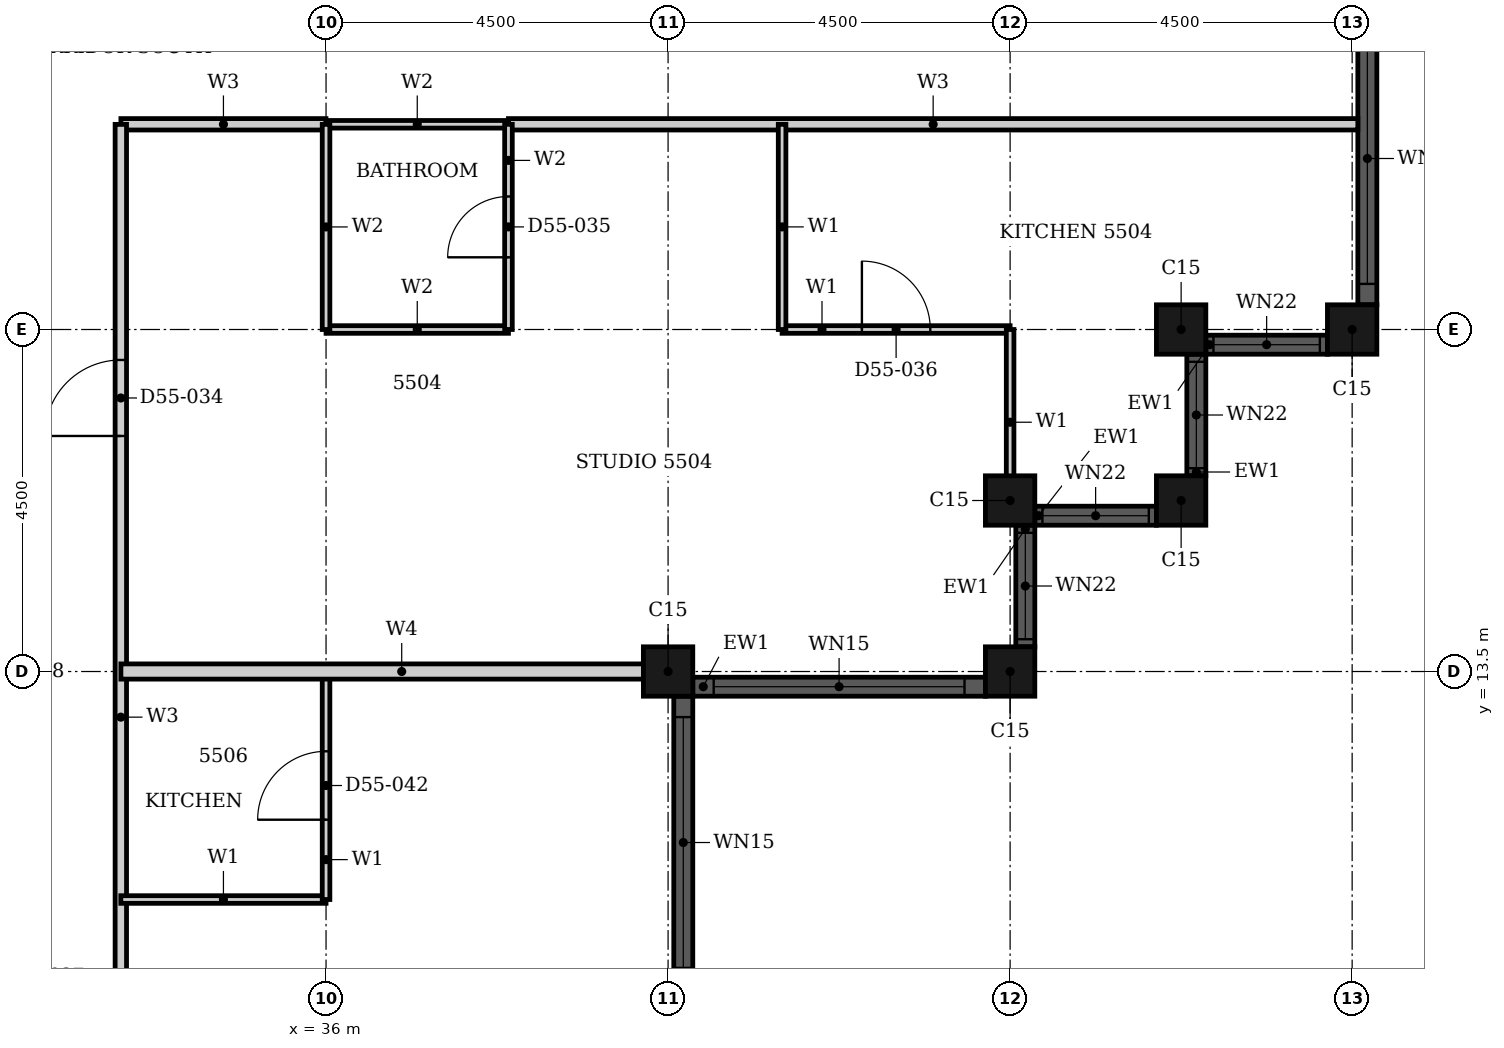
"""IFC4 building model, lengths in metres.
Left out: names, types, materials, properties, quantities, classifications, styles, units other than length and angle.
Written with IfcOpenShell. Run it as: python <this file> out.ifc"""

import sys

from ifc_helpers import new_model, si_unit, direction, frame, frame_2d, origin, origin_2d, place, context, subcontext, project, spatial, rectangle, hollow_rectangle, extrude, element, fill, save


model = new_model("IFC4")
c1 = context("Model", 3, precision=1e-05, world=origin(), true_north=direction((0.0, 1.0)))
c2 = subcontext(c1, "Body", "Model", "MODEL_VIEW")
j1 = project(units=[si_unit("LENGTHUNIT", "METRE"), si_unit("PLANEANGLEUNIT", "RADIAN")], contexts=[c1])
p1 = place(None, origin())
s1 = spatial("IfcSite", under=j1, at=p1, CompositionType="ELEMENT")
p2 = place(p1, origin())
s2 = spatial("IfcBuilding", under=s1, at=p2, CompositionType="ELEMENT")
p3 = place(p2, frame((0.0, 0.0, 218.3)))
s3 = spatial("IfcBuildingStorey", under=s2, at=p3, CompositionType="ELEMENT", Elevation=218.3)
for number, where, z_axis, x_axis in (
    (1, (40.5, 13.5, 0.0), (0.0, 0.0, 1.0), (1.0, 0.0, 0.0)),
    (2, (45.0, 13.5, 0.0), (0.0, 0.0, 1.0), (1.0, 0.0, 0.0)),
    (3, (45.0, 15.75, 0.0), (0.0, 0.0, 1.0), (1.0, 0.0, 0.0)),
    (4, (47.25, 15.75, 0.0), (0.0, 0.0, 1.0), (1.0, 0.0, 0.0)),
    (5, (47.25, 18.0, 0.0), (0.0, 0.0, 1.0), (1.0, 0.0, 0.0)),
    (6, (49.5, 18.0, 0.0), (0.0, 0.0, 1.0), (1.0, 0.0, 0.0)),
):
    element("IfcColumn", number, at=place(p3, frame(where, z_axis=z_axis, x_axis=x_axis)), inside=s3, PredefinedType="COLUMN", context=c2, shape_type="SweptSolid", body=[
        extrude(hollow_rectangle(XDim=0.65, YDim=0.65, WallThickness=0.021, at=origin_2d()), origin(), (0.0, 0.0, 1.0), 3.7),
    ])
p4 = place(p3, frame((40.825, 13.3, 0.0), z_axis=(0.0, 0.0, 1.0), x_axis=(1.0, 0.0, 0.0)))
e7 = element("IfcWall", 7, at=p4, inside=s3, PredefinedType="SOLIDWALL", context=c2, shape_type="SweptSolid", body=[
    extrude(rectangle(XDim=3.85, YDim=0.25, at=frame_2d((1.925, 0.0))), origin(), (0.0, 0.0, 1.0), 3.7),
])
p5 = place(p4, frame((0.275, 0.0, 0.45)))
e8 = element("IfcOpeningElement", 8, at=p5, cuts=e7, PredefinedType="OPENING", context=c2, shape_type="SweptSolid", body=[
    extrude(rectangle(XDim=3.3, YDim=2.3, at=frame_2d((1.65, 1.15))), frame((0.0, 0.135, 0.0), z_axis=(0.0, -1.0, 0.0), x_axis=(1.0, 0.0, 0.0)), (0.0, 0.0, 1.0), 0.27),
])
p6 = place(p3, frame((45.2, 13.825, 0.0), z_axis=(0.0, 0.0, 1.0), x_axis=(0.0, 1.0, 0.0)))
e9 = element("IfcWall", 9, at=p6, inside=s3, PredefinedType="SOLIDWALL", context=c2, shape_type="SweptSolid", body=[
    extrude(rectangle(XDim=1.6, YDim=0.25, at=frame_2d((0.8, 0.0))), origin(), (0.0, 0.0, 1.0), 3.7),
])
p7 = place(p6, frame((0.1, 0.0, 0.9)))
e10 = element("IfcOpeningElement", 10, at=p7, cuts=e9, PredefinedType="OPENING", context=c2, shape_type="SweptSolid", body=[
    extrude(rectangle(XDim=1.4, YDim=1.85, at=frame_2d((0.7, 0.925))), frame((0.0, 0.135, 0.0), z_axis=(0.0, -1.0, 0.0), x_axis=(1.0, 0.0, 0.0)), (0.0, 0.0, 1.0), 0.27),
])
p8 = place(p3, frame((45.325, 15.55, 0.0), z_axis=(0.0, 0.0, 1.0), x_axis=(1.0, 0.0, 0.0)))
e11 = element("IfcWall", 11, at=p8, inside=s3, PredefinedType="SOLIDWALL", context=c2, shape_type="SweptSolid", body=[
    extrude(rectangle(XDim=1.6, YDim=0.25, at=frame_2d((0.8, 0.0))), origin(), (0.0, 0.0, 1.0), 3.7),
])
p9 = place(p8, frame((0.1, 0.0, 0.9)))
e12 = element("IfcOpeningElement", 12, at=p9, cuts=e11, PredefinedType="OPENING", context=c2, shape_type="SweptSolid", body=[
    extrude(rectangle(XDim=1.4, YDim=1.85, at=frame_2d((0.7, 0.925))), frame((0.0, 0.135, 0.0), z_axis=(0.0, -1.0, 0.0), x_axis=(1.0, 0.0, 0.0)), (0.0, 0.0, 1.0), 0.27),
])
p10 = place(p3, frame((47.45, 16.075, 0.0), z_axis=(0.0, 0.0, 1.0), x_axis=(0.0, 1.0, 0.0)))
e13 = element("IfcWall", 13, at=p10, inside=s3, PredefinedType="SOLIDWALL", context=c2, shape_type="SweptSolid", body=[
    extrude(rectangle(XDim=1.6, YDim=0.25, at=frame_2d((0.8, 0.0))), origin(), (0.0, 0.0, 1.0), 3.7),
])
p11 = place(p10, frame((0.1, 0.0, 0.9)))
e14 = element("IfcOpeningElement", 14, at=p11, cuts=e13, PredefinedType="OPENING", context=c2, shape_type="SweptSolid", body=[
    extrude(rectangle(XDim=1.4, YDim=1.85, at=frame_2d((0.7, 0.925))), frame((0.0, 0.135, 0.0), z_axis=(0.0, -1.0, 0.0), x_axis=(1.0, 0.0, 0.0)), (0.0, 0.0, 1.0), 0.27),
])
p12 = place(p3, frame((47.575, 17.8, 0.0), z_axis=(0.0, 0.0, 1.0), x_axis=(1.0, 0.0, 0.0)))
e15 = element("IfcWall", 15, at=p12, inside=s3, PredefinedType="SOLIDWALL", context=c2, shape_type="SweptSolid", body=[
    extrude(rectangle(XDim=1.6, YDim=0.25, at=frame_2d((0.8, 0.0))), origin(), (0.0, 0.0, 1.0), 3.7),
])
p13 = place(p12, frame((0.1, 0.0, 0.9)))
e16 = element("IfcOpeningElement", 16, at=p13, cuts=e15, PredefinedType="OPENING", context=c2, shape_type="SweptSolid", body=[
    extrude(rectangle(XDim=1.4, YDim=1.85, at=frame_2d((0.7, 0.925))), frame((0.0, 0.135, 0.0), z_axis=(0.0, -1.0, 0.0), x_axis=(1.0, 0.0, 0.0)), (0.0, 0.0, 1.0), 0.27),
])
p14 = place(p3, frame((49.7, 18.325, 0.0), z_axis=(0.0, 0.0, 1.0), x_axis=(0.0, 1.0, 0.0)))
e17 = element("IfcWall", 17, at=p14, inside=s3, PredefinedType="SOLIDWALL", context=c2, shape_type="SweptSolid", body=[
    extrude(rectangle(XDim=8.35, YDim=0.25, at=frame_2d((4.175, 0.0))), origin(), (0.0, 0.0, 1.0), 3.7),
])
p15 = place(p14, frame((0.275, 0.0, 0.45)))
e18 = element("IfcOpeningElement", 18, at=p15, cuts=e17, PredefinedType="OPENING", context=c2, shape_type="SweptSolid", body=[
    extrude(rectangle(XDim=3.3, YDim=2.3, at=frame_2d((1.65, 1.15))), frame((0.0, 0.135, 0.0), z_axis=(0.0, -1.0, 0.0), x_axis=(1.0, 0.0, 0.0)), (0.0, 0.0, 1.0), 0.27),
])
p16 = place(p14, frame((4.775, 0.0, 0.45)))
e19 = element("IfcOpeningElement", 19, at=p16, cuts=e17, PredefinedType="OPENING", context=c2, shape_type="SweptSolid", body=[
    extrude(rectangle(XDim=3.3, YDim=2.3, at=frame_2d((1.65, 1.15))), frame((0.0, 0.135, 0.0), z_axis=(0.0, -1.0, 0.0), x_axis=(1.0, 0.0, 0.0)), (0.0, 0.0, 1.0), 0.27),
])
p17 = place(p3, frame((40.7, 4.825, 0.0), z_axis=(0.0, 0.0, 1.0), x_axis=(0.0, 1.0, 0.0)))
e20 = element("IfcWall", 20, at=p17, inside=s3, PredefinedType="SOLIDWALL", context=c2, shape_type="SweptSolid", body=[
    extrude(rectangle(XDim=8.35, YDim=0.25, at=frame_2d((4.175, 0.0))), origin(), (0.0, 0.0, 1.0), 3.7),
])
p18 = place(p17, frame((0.275, 0.0, 0.45)))
e21 = element("IfcOpeningElement", 21, at=p18, cuts=e20, PredefinedType="OPENING", context=c2, shape_type="SweptSolid", body=[
    extrude(rectangle(XDim=3.3, YDim=2.3, at=frame_2d((1.65, 1.15))), frame((0.0, 0.135, 0.0), z_axis=(0.0, -1.0, 0.0), x_axis=(1.0, 0.0, 0.0)), (0.0, 0.0, 1.0), 0.27),
])
p19 = place(p17, frame((4.775, 0.0, 0.45)))
e22 = element("IfcOpeningElement", 22, at=p19, cuts=e20, PredefinedType="OPENING", context=c2, shape_type="SweptSolid", body=[
    extrude(rectangle(XDim=3.3, YDim=2.3, at=frame_2d((1.65, 1.15))), frame((0.0, 0.135, 0.0), z_axis=(0.0, -1.0, 0.0), x_axis=(1.0, 0.0, 0.0)), (0.0, 0.0, 1.0), 0.27),
])
p20 = place(p3, frame((33.301, 20.7, 0.0), z_axis=(0.0, 0.0, 1.0), x_axis=(1.0, 0.0, 0.0)))
e23 = element("IfcWall", 23, at=p20, inside=s3, PredefinedType="PARTITIONING", context=c2, shape_type="SweptSolid", body=[
    extrude(rectangle(XDim=2.698, YDim=0.15, at=frame_2d((1.349, 0.0))), origin(), (0.0, 0.0, 1.0), 3.4),
])
p21 = place(p3, frame((38.4, 20.7, 0.0), z_axis=(0.0, 0.0, 1.0), x_axis=(1.0, 0.0, 0.0)))
e24 = element("IfcWall", 24, at=p21, inside=s3, PredefinedType="PARTITIONING", context=c2, shape_type="SweptSolid", body=[
    extrude(rectangle(XDim=11.175, YDim=0.15, at=frame_2d((5.587, 0.0))), origin(), (0.0, 0.0, 1.0), 3.4),
])
p22 = place(p3, frame((33.3, 6.9, 0.0), z_axis=(0.0, 0.0, 1.0), x_axis=(0.0, 1.0, 0.0)))
e25 = element("IfcWall", 25, at=p22, inside=s3, PredefinedType="PARTITIONING", context=c2, shape_type="SweptSolid", body=[
    extrude(rectangle(XDim=13.799, YDim=0.15, at=frame_2d((6.899, 0.0))), origin(), (0.0, 0.0, 1.0), 3.4),
])
p23 = place(p22, frame((9.699, 0.0, 0.0)))
e26 = element("IfcOpeningElement", 26, at=p23, cuts=e25, PredefinedType="OPENING", context=c2, shape_type="SweptSolid", body=[
    extrude(rectangle(XDim=1.0, YDim=2.2, at=frame_2d((0.5, 1.1))), frame((0.0, 0.085, 0.0), z_axis=(0.0, -1.0, 0.0), x_axis=(1.0, 0.0, 0.0)), (0.0, 0.0, 1.0), 0.17),
])
p24 = place(p22, frame((1.3, 0.0, 0.0)))
e27 = element("IfcOpeningElement", 27, at=p24, cuts=e25, PredefinedType="OPENING", context=c2, shape_type="SweptSolid", body=[
    extrude(rectangle(XDim=1.0, YDim=2.2, at=frame_2d((0.5, 1.1))), frame((0.0, 0.085, 0.0), z_axis=(0.0, -1.0, 0.0), x_axis=(1.0, 0.0, 0.0)), (0.0, 0.0, 1.0), 0.17),
])
p25 = place(p3, frame((33.3, 10.5, 0.0), z_axis=(0.0, 0.0, 1.0), x_axis=(1.0, 0.0, 0.0)))
e28 = element("IfcWall", 28, at=p25, inside=s3, PredefinedType="PARTITIONING", context=c2, shape_type="SweptSolid", body=[
    extrude(rectangle(XDim=2.7, YDim=0.1, at=frame_2d((1.35, 0.0))), origin(), (0.0, 0.0, 1.0), 3.4),
])
p26 = place(p3, frame((42.0, 18.0, 0.0), z_axis=(0.0, 0.0, 1.0), x_axis=(1.0, 0.0, 0.0)))
e29 = element("IfcWall", 29, at=p26, inside=s3, PredefinedType="PARTITIONING", context=c2, shape_type="SweptSolid", body=[
    extrude(rectangle(XDim=3.0, YDim=0.1, at=frame_2d((1.5, 0.0))), origin(), (0.0, 0.0, 1.0), 3.4),
])
p27 = place(p26, frame((1.05, 0.0, 0.0)))
e30 = element("IfcOpeningElement", 30, at=p27, cuts=e29, PredefinedType="OPENING", context=c2, shape_type="SweptSolid", body=[
    extrude(rectangle(XDim=0.9, YDim=2.1, at=frame_2d((0.45, 1.05))), frame((0.0, 0.06, 0.0), z_axis=(0.0, -1.0, 0.0), x_axis=(1.0, 0.0, 0.0)), (0.0, 0.0, 1.0), 0.12),
])
p28 = place(p3, frame((36.0, 10.5, 0.0), z_axis=(0.0, 0.0, 1.0), x_axis=(0.0, 1.0, 0.0)))
e31 = element("IfcWall", 31, at=p28, inside=s3, PredefinedType="PARTITIONING", context=c2, shape_type="SweptSolid", body=[
    extrude(rectangle(XDim=3.0, YDim=0.1, at=frame_2d((1.5, 0.0))), origin(), (0.0, 0.0, 1.0), 2.68),
])
p29 = place(p28, frame((1.05, 0.0, 0.0)))
e32 = element("IfcOpeningElement", 32, at=p29, cuts=e31, PredefinedType="OPENING", context=c2, shape_type="SweptSolid", body=[
    extrude(rectangle(XDim=0.9, YDim=2.1, at=frame_2d((0.45, 1.05))), frame((0.0, 0.06, 0.0), z_axis=(0.0, -1.0, 0.0), x_axis=(1.0, 0.0, 0.0)), (0.0, 0.0, 1.0), 0.12),
])
p30 = place(p3, frame((42.0, 18.0, 0.0), z_axis=(0.0, 0.0, 1.0), x_axis=(0.0, 1.0, 0.0)))
e33 = element("IfcWall", 33, at=p30, inside=s3, PredefinedType="PARTITIONING", context=c2, shape_type="SweptSolid", body=[
    extrude(rectangle(XDim=2.7, YDim=0.1, at=frame_2d((1.35, 0.0))), origin(), (0.0, 0.0, 1.0), 3.4),
])
p31 = place(p3, frame((45.0, 15.56, 0.0), z_axis=(0.0, 0.0, 1.0), x_axis=(0.0, 1.0, 0.0)))
e34 = element("IfcWall", 34, at=p31, inside=s3, PredefinedType="PARTITIONING", context=c2, shape_type="SweptSolid", body=[
    extrude(rectangle(XDim=2.44, YDim=0.1, at=frame_2d((1.22, 0.0))), origin(), (0.0, 0.0, 1.0), 3.4),
])
p32 = place(p3, frame((33.301, 13.5, 0.0), z_axis=(0.0, 0.0, 1.0), x_axis=(1.0, 0.0, 0.0)))
e35 = element("IfcWall", 35, at=p32, inside=s3, PredefinedType="PARTITIONING", context=c2, shape_type="SweptSolid", body=[
    extrude(rectangle(XDim=7.389, YDim=0.2, at=frame_2d((3.694, 0.0))), origin(), (0.0, 0.0, 1.0), 2.48),
])
for number, where, z_axis, x_axis in (
    (36, (36.0, 18.0, 0.0), (0.0, 0.0, 1.0), (1.0, 0.0, 0.0)),
    (37, (36.0, 20.7, 0.0), (0.0, 0.0, 1.0), (1.0, 0.0, 0.0)),
):
    element("IfcWall", number, at=place(p3, frame(where, z_axis=z_axis, x_axis=x_axis)), inside=s3, PredefinedType="PARTITIONING", context=c2, shape_type="SweptSolid", body=[
        extrude(rectangle(XDim=2.4, YDim=0.1, at=frame_2d((1.2, 0.0))), origin(), (0.0, 0.0, 1.0), 3.4),
    ])
p33 = place(p3, frame((36.0, 18.0, 0.0), z_axis=(0.0, 0.0, 1.0), x_axis=(0.0, 1.0, 0.0)))
e38 = element("IfcWall", 38, at=p33, inside=s3, PredefinedType="PARTITIONING", context=c2, shape_type="SweptSolid", body=[
    extrude(rectangle(XDim=2.699, YDim=0.1, at=frame_2d((1.35, 0.0))), origin(), (0.0, 0.0, 1.0), 3.4),
])
p34 = place(p3, frame((38.4, 18.0, 0.0), z_axis=(0.0, 0.0, 1.0), x_axis=(0.0, 1.0, 0.0)))
e39 = element("IfcWall", 39, at=p34, inside=s3, PredefinedType="PARTITIONING", context=c2, shape_type="SweptSolid", body=[
    extrude(rectangle(XDim=2.7, YDim=0.1, at=frame_2d((1.35, 0.0))), origin(), (0.0, 0.0, 1.0), 3.4),
])
p35 = place(p34, frame((0.95, 0.0, 0.0)))
e40 = element("IfcOpeningElement", 40, at=p35, cuts=e39, PredefinedType="OPENING", context=c2, shape_type="SweptSolid", body=[
    extrude(rectangle(XDim=0.8, YDim=2.1, at=frame_2d((0.4, 1.05))), frame((0.0, 0.06, 0.0), z_axis=(0.0, -1.0, 0.0), x_axis=(1.0, 0.0, 0.0)), (0.0, 0.0, 1.0), 0.12),
])
p36 = place(p5, origin())
e41 = element("IfcWindow", 41, at=p36, inside=s3, PartitioningType="SINGLE_PANEL", PredefinedType="WINDOW", context=c2, shape_type="SweptSolid", body=[
    extrude(rectangle(XDim=3.3, YDim=2.3, at=frame_2d((1.65, 1.15))), frame((0.0, 0.03, 0.0), z_axis=(0.0, -1.0, 0.0), x_axis=(1.0, 0.0, 0.0)), (0.0, 0.0, 1.0), 0.06),
])
fill(e8, e41)
p37 = place(p7, origin())
e42 = element("IfcWindow", 42, at=p37, inside=s3, PartitioningType="SINGLE_PANEL", PredefinedType="WINDOW", context=c2, shape_type="SweptSolid", body=[
    extrude(rectangle(XDim=1.4, YDim=1.85, at=frame_2d((0.7, 0.925))), frame((0.0, 0.03, 0.0), z_axis=(0.0, -1.0, 0.0), x_axis=(1.0, 0.0, 0.0)), (0.0, 0.0, 1.0), 0.06),
])
fill(e10, e42)
p38 = place(p9, origin())
e43 = element("IfcWindow", 43, at=p38, inside=s3, PartitioningType="SINGLE_PANEL", PredefinedType="WINDOW", context=c2, shape_type="SweptSolid", body=[
    extrude(rectangle(XDim=1.4, YDim=1.85, at=frame_2d((0.7, 0.925))), frame((0.0, 0.03, 0.0), z_axis=(0.0, -1.0, 0.0), x_axis=(1.0, 0.0, 0.0)), (0.0, 0.0, 1.0), 0.06),
])
fill(e12, e43)
p39 = place(p11, origin())
e44 = element("IfcWindow", 44, at=p39, inside=s3, PartitioningType="SINGLE_PANEL", PredefinedType="WINDOW", context=c2, shape_type="SweptSolid", body=[
    extrude(rectangle(XDim=1.4, YDim=1.85, at=frame_2d((0.7, 0.925))), frame((0.0, 0.03, 0.0), z_axis=(0.0, -1.0, 0.0), x_axis=(1.0, 0.0, 0.0)), (0.0, 0.0, 1.0), 0.06),
])
fill(e14, e44)
p40 = place(p13, origin())
e45 = element("IfcWindow", 45, at=p40, inside=s3, PartitioningType="SINGLE_PANEL", PredefinedType="WINDOW", context=c2, shape_type="SweptSolid", body=[
    extrude(rectangle(XDim=1.4, YDim=1.85, at=frame_2d((0.7, 0.925))), frame((0.0, 0.03, 0.0), z_axis=(0.0, -1.0, 0.0), x_axis=(1.0, 0.0, 0.0)), (0.0, 0.0, 1.0), 0.06),
])
fill(e16, e45)
p41 = place(p15, origin())
e46 = element("IfcWindow", 46, at=p41, inside=s3, PartitioningType="SINGLE_PANEL", PredefinedType="WINDOW", context=c2, shape_type="SweptSolid", body=[
    extrude(rectangle(XDim=3.3, YDim=2.3, at=frame_2d((1.65, 1.15))), frame((0.0, 0.03, 0.0), z_axis=(0.0, -1.0, 0.0), x_axis=(1.0, 0.0, 0.0)), (0.0, 0.0, 1.0), 0.06),
])
fill(e18, e46)
p42 = place(p19, origin())
e47 = element("IfcWindow", 47, at=p42, inside=s3, PartitioningType="SINGLE_PANEL", PredefinedType="WINDOW", context=c2, shape_type="SweptSolid", body=[
    extrude(rectangle(XDim=3.3, YDim=2.3, at=frame_2d((1.65, 1.15))), frame((0.0, 0.03, 0.0), z_axis=(0.0, -1.0, 0.0), x_axis=(1.0, 0.0, 0.0)), (0.0, 0.0, 1.0), 0.06),
])
fill(e22, e47)
p43 = place(p23, origin())
e48 = element("IfcDoor", 48, at=p43, inside=s3, OperationType="SINGLE_SWING_RIGHT", PredefinedType="DOOR", context=c2, shape_type="SweptSolid", body=[
    extrude(rectangle(XDim=1.0, YDim=2.2, at=frame_2d((0.5, 1.1))), frame((0.0, 0.025, 0.0), z_axis=(0.0, -1.0, 0.0), x_axis=(1.0, 0.0, 0.0)), (0.0, 0.0, 1.0), 0.05),
])
fill(e26, e48)
p44 = place(p35, origin())
e49 = element("IfcDoor", 49, at=p44, inside=s3, OperationType="SINGLE_SWING_LEFT", PredefinedType="DOOR", context=c2, shape_type="SweptSolid", body=[
    extrude(rectangle(XDim=0.8, YDim=2.1, at=frame_2d((0.4, 1.05))), frame((0.0, 0.025, 0.0), z_axis=(0.0, -1.0, 0.0), x_axis=(1.0, 0.0, 0.0)), (0.0, 0.0, 1.0), 0.05),
])
fill(e40, e49)
p45 = place(p27, origin())
e50 = element("IfcDoor", 50, at=p45, inside=s3, OperationType="SINGLE_SWING_RIGHT", PredefinedType="DOOR", context=c2, shape_type="SweptSolid", body=[
    extrude(rectangle(XDim=0.9, YDim=2.1, at=frame_2d((0.45, 1.05))), frame((0.0, 0.025, 0.0), z_axis=(0.0, -1.0, 0.0), x_axis=(1.0, 0.0, 0.0)), (0.0, 0.0, 1.0), 0.05),
])
fill(e30, e50)
p46 = place(p29, origin())
e51 = element("IfcDoor", 51, at=p46, inside=s3, OperationType="SINGLE_SWING_RIGHT", PredefinedType="DOOR", context=c2, shape_type="SweptSolid", body=[
    extrude(rectangle(XDim=0.9, YDim=2.1, at=frame_2d((0.45, 1.05))), frame((0.0, 0.025, 0.0), z_axis=(0.0, -1.0, 0.0), x_axis=(1.0, 0.0, 0.0)), (0.0, 0.0, 1.0), 0.05),
])
fill(e32, e51)
save(model, sys.argv[1])
